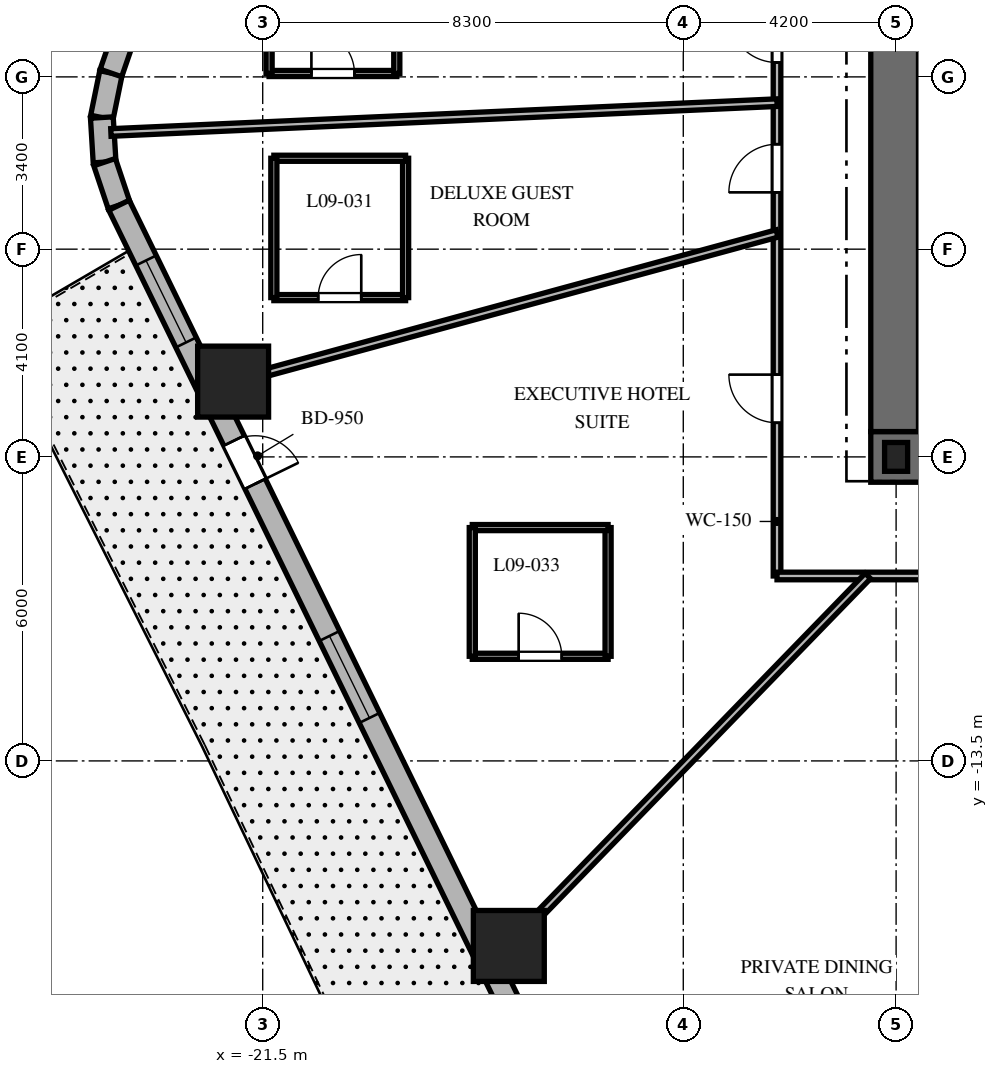
"""IFC4 building model, lengths in metres.
Left out: names, types, materials, properties, quantities, classifications, styles, units other than length and angle.
Written with IfcOpenShell. Run it as: python <this file> out.ifc"""

import sys

from ifc_helpers import new_model, si_unit, direction, frame, frame_2d, origin, origin_2d, place, context, subcontext, project, spatial, rectangle, i_section, extrude, element, fill, save


model = new_model("IFC4")
c1 = context("Model", 3, precision=1e-05, world=origin(), true_north=direction((0.0, 1.0)))
c2 = subcontext(c1, "Body", "Model", "MODEL_VIEW")
j1 = project(units=[si_unit("LENGTHUNIT", "METRE"), si_unit("PLANEANGLEUNIT", "RADIAN")], contexts=[c1])
p1 = place(None, origin())
s1 = spatial("IfcSite", under=j1, at=p1, CompositionType="ELEMENT")
p2 = place(p1, origin())
s2 = spatial("IfcBuilding", under=s1, at=p2, CompositionType="ELEMENT")
p3 = place(p2, frame((0.0, 0.0, 45.3)))
s3 = spatial("IfcBuildingStorey", under=s2, at=p3, CompositionType="ELEMENT", Elevation=45.3)
p4 = place(p3, frame((-9.5, -7.5, 0.0), z_axis=(0.0, 0.0, 1.0), x_axis=(1.0, 0.0, 0.0)))
e1 = element("IfcWall", 1, at=p4, inside=s3, PredefinedType="SHEAR", context=c2, shape_type="SweptSolid", body=[
    extrude(rectangle(XDim=19.0, YDim=1.0, at=frame_2d((9.5, 0.0))), origin(), (0.0, 0.0, 1.0), 3.7),
])
p5 = place(p4, frame((9.55, 0.0, 0.0)))
e2 = element("IfcOpeningElement", 2, at=p5, cuts=e1, PredefinedType="OPENING", context=c2, shape_type="SweptSolid", body=[
    extrude(rectangle(XDim=1.0, YDim=2.15, at=frame_2d((0.5, 1.075))), frame((0.0, 0.51, 0.0), z_axis=(0.0, -1.0, 0.0), x_axis=(1.0, 0.0, 0.0)), (0.0, 0.0, 1.0), 1.02),
])
p6 = place(p3, frame((-9.0, -7.0, 0.0), z_axis=(0.0, 0.0, 1.0), x_axis=(0.0, 1.0, 0.0)))
e3 = element("IfcWall", 3, at=p6, inside=s3, PredefinedType="SHEAR", context=c2, shape_type="SweptSolid", body=[
    extrude(rectangle(XDim=14.0, YDim=1.0, at=frame_2d((7.0, 0.0))), origin(), (0.0, 0.0, 1.0), 3.7),
])
p7 = place(p6, frame((10.125, 0.0, 0.0)))
e4 = element("IfcOpeningElement", 4, at=p7, cuts=e3, PredefinedType="OPENING", context=c2, shape_type="SweptSolid", body=[
    extrude(rectangle(XDim=1.05, YDim=2.15, at=frame_2d((0.525, 1.075))), frame((0.0, 0.51, 0.0), z_axis=(0.0, -1.0, 0.0), x_axis=(1.0, 0.0, 0.0)), (0.0, 0.0, 1.0), 1.02),
])
p8 = place(p3, frame((-8.458, -6.985, 0.0), z_axis=(0.0, 0.0, 1.0), x_axis=(0.0, 1.0, 0.0)))
e5 = element("IfcWall", 5, at=p8, inside=s3, PredefinedType="SHEAR", context=c2, shape_type="SweptSolid", body=[
    extrude(rectangle(XDim=9.143, YDim=0.2, at=frame_2d((4.572, 0.0))), origin(), (0.0, 0.0, 1.0), 3.7),
])
p9 = place(p3, frame((-9.0, -7.5, 0.0), z_axis=(0.0, 0.0, 1.0), x_axis=(1.0, 0.0, 0.0)))
e6 = element("IfcColumn", 6, at=p9, inside=s3, PredefinedType="COLUMN", context=c2, shape_type="SweptSolid", body=[
    extrude(i_section(OverallWidth=0.454, OverallDepth=0.569, WebThickness=0.078, FlangeThickness=0.125, at=origin_2d()), origin(), (0.0, 0.0, 1.0), 3.7),
])
for number, where, z_axis, x_axis in (
    (7, (-22.084, -6.014, 0.0), (0.0, 0.0, 1.0), (1.0, 0.0, 0.0)),
    (8, (-16.643, -17.152, 0.0), (0.0, 0.0, 1.0), (1.0, 0.0, 0.0)),
):
    element("IfcColumn", number, at=place(p3, frame(where, z_axis=z_axis, x_axis=x_axis)), inside=s3, PredefinedType="COLUMN", context=c2, shape_type="SweptSolid", body=[
        extrude(rectangle(XDim=1.4, YDim=1.4, at=origin_2d()), origin(), (0.0, 0.0, 1.0), 3.7),
    ])
p10 = place(p3, frame((-24.496, 0.077, 0.0), z_axis=(0.0, 0.0, 1.0), x_axis=(-0.199570594521, -0.979883451132, 0.0)))
e9 = element("IfcWall", 9, at=p10, inside=s3, PredefinedType="SOLIDWALL", context=c2, shape_type="SweptSolid", body=[
    extrude(rectangle(XDim=0.897, YDim=0.45, at=frame_2d((0.448, 0.0))), origin(), (0.0, 0.0, 1.0), 3.4),
])
p11 = place(p3, frame((-24.675, -0.802, 0.0), z_axis=(0.0, 0.0, 1.0), x_axis=(0.061188874166, -0.998126205286, 0.0)))
e10 = element("IfcWall", 10, at=p11, inside=s3, PredefinedType="SOLIDWALL", context=c2, shape_type="SweptSolid", body=[
    extrude(rectangle(XDim=0.882, YDim=0.45, at=frame_2d((0.441, 0.0))), origin(), (0.0, 0.0, 1.0), 3.4),
])
p12 = place(p3, frame((-24.621, -1.682, 0.0), z_axis=(0.0, 0.0, 1.0), x_axis=(0.317697451681, -0.948192137278, 0.0)))
e11 = element("IfcWall", 11, at=p12, inside=s3, PredefinedType="SOLIDWALL", context=c2, shape_type="SweptSolid", body=[
    extrude(rectangle(XDim=0.897, YDim=0.45, at=frame_2d((0.448, 0.0))), origin(), (0.0, 0.0, 1.0), 3.4),
])
p13 = place(p3, frame((-17.39, 20.678, 0.0), z_axis=(0.0, 0.0, 1.0), x_axis=(-0.326068018294, -0.945346310854, 0.0)))
e12 = element("IfcWall", 12, at=p13, inside=s3, PredefinedType="SOLIDWALL", context=c2, shape_type="SweptSolid", body=[
    extrude(rectangle(XDim=21.793, YDim=0.45, at=frame_2d((10.896, 0.0))), origin(), (0.0, 0.0, 1.0), 3.4),
])
p14 = place(p13, frame((5.493, 0.0, 0.0)))
e13 = element("IfcOpeningElement", 13, at=p14, cuts=e12, PredefinedType="OPENING", context=c2, shape_type="SweptSolid", body=[
    extrude(rectangle(XDim=1.0, YDim=2.15, at=frame_2d((0.5, 1.075))), frame((0.0, 0.235, 0.0), z_axis=(0.0, -1.0, 0.0), x_axis=(1.0, 0.0, 0.0)), (0.0, 0.0, 1.0), 0.47),
])
p15 = place(p13, frame((1.26, 0.0, 0.8)))
e14 = element("IfcOpeningElement", 14, at=p15, cuts=e12, PredefinedType="OPENING", context=c2, shape_type="SweptSolid", body=[
    extrude(rectangle(XDim=1.8, YDim=1.8, at=frame_2d((0.9, 0.9))), frame((0.0, 0.235, 0.0), z_axis=(0.0, -1.0, 0.0), x_axis=(1.0, 0.0, 0.0)), (0.0, 0.0, 1.0), 0.47),
])
p16 = place(p13, frame((7.283, 0.0, 0.8)))
e15 = element("IfcOpeningElement", 15, at=p16, cuts=e12, PredefinedType="OPENING", context=c2, shape_type="SweptSolid", body=[
    extrude(rectangle(XDim=1.8, YDim=1.8, at=frame_2d((0.9, 0.9))), frame((0.0, 0.235, 0.0), z_axis=(0.0, -1.0, 0.0), x_axis=(1.0, 0.0, 0.0)), (0.0, 0.0, 1.0), 0.47),
])
p17 = place(p13, frame((12.736, 0.0, 0.8)))
e16 = element("IfcOpeningElement", 16, at=p17, cuts=e12, PredefinedType="OPENING", context=c2, shape_type="SweptSolid", body=[
    extrude(rectangle(XDim=1.8, YDim=1.8, at=frame_2d((0.9, 0.9))), frame((0.0, 0.235, 0.0), z_axis=(0.0, -1.0, 0.0), x_axis=(1.0, 0.0, 0.0)), (0.0, 0.0, 1.0), 0.47),
])
p18 = place(p13, frame((18.68, 0.0, 0.8)))
e17 = element("IfcOpeningElement", 17, at=p18, cuts=e12, PredefinedType="OPENING", context=c2, shape_type="SweptSolid", body=[
    extrude(rectangle(XDim=1.8, YDim=1.8, at=frame_2d((0.9, 0.9))), frame((0.0, 0.235, 0.0), z_axis=(0.0, -1.0, 0.0), x_axis=(1.0, 0.0, 0.0)), (0.0, 0.0, 1.0), 0.47),
])
p19 = place(p3, frame((-24.336, -2.532, 0.0), z_axis=(0.0, 0.0, 1.0), x_axis=(0.438931326393, -0.898520612291, 0.0)))
e18 = element("IfcWall", 18, at=p19, inside=s3, PredefinedType="SOLIDWALL", context=c2, shape_type="SweptSolid", body=[
    extrude(rectangle(XDim=20.623, YDim=0.45, at=frame_2d((10.312, 0.0))), origin(), (0.0, 0.0, 1.0), 3.4),
])
p20 = place(p19, frame((5.171, 0.0, 0.0)))
e19 = element("IfcOpeningElement", 19, at=p20, cuts=e18, PredefinedType="OPENING", context=c2, shape_type="SweptSolid", body=[
    extrude(rectangle(XDim=0.95, YDim=2.15, at=frame_2d((0.475, 1.075))), frame((0.0, 0.235, 0.0), z_axis=(0.0, -1.0, 0.0), x_axis=(1.0, 0.0, 0.0)), (0.0, 0.0, 1.0), 0.47),
])
p21 = place(p19, frame((1.214, 0.0, 0.8)))
e20 = element("IfcOpeningElement", 20, at=p21, cuts=e18, PredefinedType="OPENING", context=c2, shape_type="SweptSolid", body=[
    extrude(rectangle(XDim=1.8, YDim=1.8, at=frame_2d((0.9, 0.9))), frame((0.0, 0.235, 0.0), z_axis=(0.0, -1.0, 0.0), x_axis=(1.0, 0.0, 0.0)), (0.0, 0.0, 1.0), 0.47),
])
p22 = place(p19, frame((9.462, 0.0, 0.8)))
e21 = element("IfcOpeningElement", 21, at=p22, cuts=e18, PredefinedType="OPENING", context=c2, shape_type="SweptSolid", body=[
    extrude(rectangle(XDim=1.8, YDim=1.8, at=frame_2d((0.9, 0.9))), frame((0.0, 0.235, 0.0), z_axis=(0.0, -1.0, 0.0), x_axis=(1.0, 0.0, 0.0)), (0.0, 0.0, 1.0), 0.47),
])
p23 = place(p19, frame((17.66, 0.0, 0.8)))
e22 = element("IfcOpeningElement", 22, at=p23, cuts=e18, PredefinedType="OPENING", context=c2, shape_type="SweptSolid", body=[
    extrude(rectangle(XDim=1.8, YDim=1.8, at=frame_2d((0.9, 0.9))), frame((0.0, 0.235, 0.0), z_axis=(0.0, -1.0, 0.0), x_axis=(1.0, 0.0, 0.0)), (0.0, 0.0, 1.0), 0.47),
])
p24 = place(p3, frame((-11.35, -9.85, 0.0), z_axis=(0.0, 0.0, 1.0), x_axis=(0.0, 1.0, 0.0)))
e23 = element("IfcWall", 23, at=p24, inside=s3, PredefinedType="PARTITIONING", context=c2, shape_type="SweptSolid", body=[
    extrude(rectangle(XDim=19.7, YDim=0.15, at=frame_2d((9.85, 0.0))), origin(), (0.0, 0.0, 1.0), 2.84),
])
p25 = place(p24, frame((17.181, 0.0, 0.0)))
e24 = element("IfcOpeningElement", 24, at=p25, cuts=e23, PredefinedType="OPENING", context=c2, shape_type="SweptSolid", body=[
    extrude(rectangle(XDim=0.95, YDim=2.03, at=frame_2d((0.475, 1.015))), frame((0.0, 0.085, 0.0), z_axis=(0.0, -1.0, 0.0), x_axis=(1.0, 0.0, 0.0)), (0.0, 0.0, 1.0), 0.17),
])
p26 = place(p24, frame((13.403, 0.0, 0.0)))
e25 = element("IfcOpeningElement", 25, at=p26, cuts=e23, PredefinedType="OPENING", context=c2, shape_type="SweptSolid", body=[
    extrude(rectangle(XDim=0.95, YDim=2.03, at=frame_2d((0.475, 1.015))), frame((0.0, 0.085, 0.0), z_axis=(0.0, -1.0, 0.0), x_axis=(1.0, 0.0, 0.0)), (0.0, 0.0, 1.0), 0.17),
])
p27 = place(p24, frame((10.134, 0.0, 0.0)))
e26 = element("IfcOpeningElement", 26, at=p27, cuts=e23, PredefinedType="OPENING", context=c2, shape_type="SweptSolid", body=[
    extrude(rectangle(XDim=0.95, YDim=2.03, at=frame_2d((0.475, 1.015))), frame((0.0, 0.085, 0.0), z_axis=(0.0, -1.0, 0.0), x_axis=(1.0, 0.0, 0.0)), (0.0, 0.0, 1.0), 0.17),
])
p28 = place(p24, frame((7.571, 0.0, 0.0)))
e27 = element("IfcOpeningElement", 27, at=p28, cuts=e23, PredefinedType="OPENING", context=c2, shape_type="SweptSolid", body=[
    extrude(rectangle(XDim=0.95, YDim=2.03, at=frame_2d((0.475, 1.015))), frame((0.0, 0.085, 0.0), z_axis=(0.0, -1.0, 0.0), x_axis=(1.0, 0.0, 0.0)), (0.0, 0.0, 1.0), 0.17),
])
p29 = place(p24, frame((3.024, 0.0, 0.0)))
e28 = element("IfcOpeningElement", 28, at=p29, cuts=e23, PredefinedType="OPENING", context=c2, shape_type="SweptSolid", body=[
    extrude(rectangle(XDim=0.95, YDim=2.03, at=frame_2d((0.475, 1.015))), frame((0.0, 0.085, 0.0), z_axis=(0.0, -1.0, 0.0), x_axis=(1.0, 0.0, 0.0)), (0.0, 0.0, 1.0), 0.17),
])
p30 = place(p3, frame((11.35, -9.85, 0.0), z_axis=(0.0, 0.0, 1.0), x_axis=(-1.0, 0.0, 0.0)))
e29 = element("IfcWall", 29, at=p30, inside=s3, PredefinedType="PARTITIONING", context=c2, shape_type="SweptSolid", body=[
    extrude(rectangle(XDim=22.7, YDim=0.15, at=frame_2d((11.35, 0.0))), origin(), (0.0, 0.0, 1.0), 2.84),
])
p31 = place(p30, frame((17.225, 0.0, 0.0)))
e30 = element("IfcOpeningElement", 30, at=p31, cuts=e29, PredefinedType="OPENING", context=c2, shape_type="SweptSolid", body=[
    extrude(rectangle(XDim=0.95, YDim=2.03, at=frame_2d((0.475, 1.015))), frame((0.0, 0.085, 0.0), z_axis=(0.0, -1.0, 0.0), x_axis=(1.0, 0.0, 0.0)), (0.0, 0.0, 1.0), 0.17),
])
p32 = place(p30, frame((12.214, 0.0, 0.0)))
e31 = element("IfcOpeningElement", 31, at=p32, cuts=e29, PredefinedType="OPENING", context=c2, shape_type="SweptSolid", body=[
    extrude(rectangle(XDim=0.95, YDim=2.03, at=frame_2d((0.475, 1.015))), frame((0.0, 0.085, 0.0), z_axis=(0.0, -1.0, 0.0), x_axis=(1.0, 0.0, 0.0)), (0.0, 0.0, 1.0), 0.17),
])
p33 = place(p30, frame((8.725, 0.0, 0.0)))
e32 = element("IfcOpeningElement", 32, at=p33, cuts=e29, PredefinedType="OPENING", context=c2, shape_type="SweptSolid", body=[
    extrude(rectangle(XDim=0.95, YDim=2.03, at=frame_2d((0.475, 1.015))), frame((0.0, 0.085, 0.0), z_axis=(0.0, -1.0, 0.0), x_axis=(1.0, 0.0, 0.0)), (0.0, 0.0, 1.0), 0.17),
])
p34 = place(p30, frame((3.369, 0.0, 0.0)))
e33 = element("IfcOpeningElement", 33, at=p34, cuts=e29, PredefinedType="OPENING", context=c2, shape_type="SweptSolid", body=[
    extrude(rectangle(XDim=0.95, YDim=2.03, at=frame_2d((0.475, 1.015))), frame((0.0, 0.085, 0.0), z_axis=(0.0, -1.0, 0.0), x_axis=(1.0, 0.0, 0.0)), (0.0, 0.0, 1.0), 0.17),
])
p35 = place(p3, frame((-11.35, -0.508, 0.0), z_axis=(0.0, 0.0, 1.0), x_axis=(-0.998998237556, -0.044749540337, 0.0)))
e34 = element("IfcWall", 34, at=p35, inside=s3, PredefinedType="PARTITIONING", context=c2, shape_type="SweptSolid", body=[
    extrude(rectangle(XDim=13.159, YDim=0.15, at=frame_2d((6.58, 0.0))), origin(), (0.0, 0.0, 1.0), 2.54),
])
p36 = place(p3, frame((-11.35, -3.091, 0.0), z_axis=(0.0, 0.0, 1.0), x_axis=(-0.964859685283, -0.262765651704, 0.0)))
e35 = element("IfcWall", 35, at=p36, inside=s3, PredefinedType="PARTITIONING", context=c2, shape_type="SweptSolid", body=[
    extrude(rectangle(XDim=11.629, YDim=0.15, at=frame_2d((5.814, 0.0))), origin(), (0.0, 0.0, 1.0), 2.54),
])
p37 = place(p3, frame((-9.558, -9.85, 0.0), z_axis=(0.0, 0.0, 1.0), x_axis=(-0.69638346089, -0.717669893056, 0.0)))
e36 = element("IfcWall", 36, at=p37, inside=s3, PredefinedType="PARTITIONING", context=c2, shape_type="SweptSolid", body=[
    extrude(rectangle(XDim=10.701, YDim=0.15, at=frame_2d((5.351, 0.0))), origin(), (0.0, 0.0, 1.0), 2.54),
])
p38 = place(p3, frame((-21.374, 0.067, 0.0), z_axis=(0.0, 0.0, 1.0), x_axis=(1.0, 0.0, 0.0)))
e37 = element("IfcWall", 37, at=p38, inside=s3, PredefinedType="PARTITIONING", context=c2, shape_type="SweptSolid", body=[
    extrude(rectangle(XDim=2.52, YDim=0.12, at=frame_2d((1.26, 0.0))), origin(), (0.0, 0.0, 1.0), 3.4),
])
p39 = place(p38, frame((0.835, 0.0, 0.0)))
e38 = element("IfcOpeningElement", 38, at=p39, cuts=e37, PredefinedType="OPENING", context=c2, shape_type="SweptSolid", body=[
    extrude(rectangle(XDim=0.85, YDim=2.03, at=frame_2d((0.425, 1.015))), frame((0.0, 0.07, 0.0), z_axis=(0.0, -1.0, 0.0), x_axis=(1.0, 0.0, 0.0)), (0.0, 0.0, 1.0), 0.14),
])
for number, where, z_axis, x_axis in (
    (39, (-18.854, 0.067, 0.0), (0.0, 0.0, 1.0), (0.0, 1.0, 0.0)),
    (40, (-21.374, 2.747, 0.0), (0.0, 0.0, 1.0), (0.0, -1.0, 0.0)),
):
    element("IfcWall", number, at=place(p3, frame(where, z_axis=z_axis, x_axis=x_axis)), inside=s3, PredefinedType="PARTITIONING", context=c2, shape_type="SweptSolid", body=[
        extrude(rectangle(XDim=2.68, YDim=0.12, at=frame_2d((1.34, 0.0))), origin(), (0.0, 0.0, 1.0), 3.4),
    ])
p40 = place(p3, frame((-21.28, -4.356, 0.0), z_axis=(0.0, 0.0, 1.0), x_axis=(1.0, 0.0, 0.0)))
e41 = element("IfcWall", 41, at=p40, inside=s3, PredefinedType="PARTITIONING", context=c2, shape_type="SweptSolid", body=[
    extrude(rectangle(XDim=2.6, YDim=0.12, at=frame_2d((1.3, 0.0))), origin(), (0.0, 0.0, 1.0), 3.4),
])
p41 = place(p40, frame((0.875, 0.0, 0.0)))
e42 = element("IfcOpeningElement", 42, at=p41, cuts=e41, PredefinedType="OPENING", context=c2, shape_type="SweptSolid", body=[
    extrude(rectangle(XDim=0.85, YDim=2.03, at=frame_2d((0.425, 1.015))), frame((0.0, 0.07, 0.0), z_axis=(0.0, -1.0, 0.0), x_axis=(1.0, 0.0, 0.0)), (0.0, 0.0, 1.0), 0.14),
])
p42 = place(p3, frame((-18.68, -4.356, 0.0), z_axis=(0.0, 0.0, 1.0), x_axis=(0.0, 1.0, 0.0)))
e43 = element("IfcWall", 43, at=p42, inside=s3, PredefinedType="PARTITIONING", context=c2, shape_type="SweptSolid", body=[
    extrude(rectangle(XDim=2.75, YDim=0.12, at=frame_2d((1.375, 0.0))), origin(), (0.0, 0.0, 1.0), 3.4),
])
p43 = place(p3, frame((-18.68, -1.606, 0.0), z_axis=(0.0, 0.0, 1.0), x_axis=(-1.0, 0.0, 0.0)))
e44 = element("IfcWall", 44, at=p43, inside=s3, PredefinedType="PARTITIONING", context=c2, shape_type="SweptSolid", body=[
    extrude(rectangle(XDim=2.6, YDim=0.12, at=frame_2d((1.3, 0.0))), origin(), (0.0, 0.0, 1.0), 3.4),
])
p44 = place(p3, frame((-21.28, -1.606, 0.0), z_axis=(0.0, 0.0, 1.0), x_axis=(0.0, -1.0, 0.0)))
e45 = element("IfcWall", 45, at=p44, inside=s3, PredefinedType="PARTITIONING", context=c2, shape_type="SweptSolid", body=[
    extrude(rectangle(XDim=2.75, YDim=0.12, at=frame_2d((1.375, 0.0))), origin(), (0.0, 0.0, 1.0), 3.4),
])
p45 = place(p3, frame((-17.364, -11.435, 0.0), z_axis=(0.0, 0.0, 1.0), x_axis=(1.0, 0.0, 0.0)))
e46 = element("IfcWall", 46, at=p45, inside=s3, PredefinedType="PARTITIONING", context=c2, shape_type="SweptSolid", body=[
    extrude(rectangle(XDim=2.68, YDim=0.12, at=frame_2d((1.34, 0.0))), origin(), (0.0, 0.0, 1.0), 2.927),
])
p46 = place(p45, frame((0.915, 0.0, 0.0)))
e47 = element("IfcOpeningElement", 47, at=p46, cuts=e46, PredefinedType="OPENING", context=c2, shape_type="SweptSolid", body=[
    extrude(rectangle(XDim=0.85, YDim=2.03, at=frame_2d((0.425, 1.015))), frame((0.0, 0.07, 0.0), z_axis=(0.0, -1.0, 0.0), x_axis=(1.0, 0.0, 0.0)), (0.0, 0.0, 1.0), 0.14),
])
p47 = place(p3, frame((-14.684, -11.435, 0.0), z_axis=(0.0, 0.0, 1.0), x_axis=(0.0, 1.0, 0.0)))
e48 = element("IfcWall", 48, at=p47, inside=s3, PredefinedType="PARTITIONING", context=c2, shape_type="SweptSolid", body=[
    extrude(rectangle(XDim=2.54, YDim=0.12, at=frame_2d((1.27, 0.0))), origin(), (0.0, 0.0, 1.0), 3.4),
])
p48 = place(p3, frame((-14.684, -8.895, 0.0), z_axis=(0.0, 0.0, 1.0), x_axis=(-1.0, 0.0, 0.0)))
e49 = element("IfcWall", 49, at=p48, inside=s3, PredefinedType="PARTITIONING", context=c2, shape_type="SweptSolid", body=[
    extrude(rectangle(XDim=2.68, YDim=0.12, at=frame_2d((1.34, 0.0))), origin(), (0.0, 0.0, 1.0), 2.927),
])
p49 = place(p3, frame((-17.364, -8.895, 0.0), z_axis=(0.0, 0.0, 1.0), x_axis=(0.0, -1.0, 0.0)))
e50 = element("IfcWall", 50, at=p49, inside=s3, PredefinedType="PARTITIONING", context=c2, shape_type="SweptSolid", body=[
    extrude(rectangle(XDim=2.54, YDim=0.12, at=frame_2d((1.27, 0.0))), origin(), (0.0, 0.0, 1.0), 3.4),
])
p50 = place(p20, origin())
e51 = element("IfcDoor", 51, at=p50, inside=s3, OperationType="SINGLE_SWING_RIGHT", PredefinedType="DOOR", context=c2, shape_type="SweptSolid", body=[
    extrude(rectangle(XDim=0.95, YDim=2.15, at=frame_2d((0.475, 1.075))), frame((0.0, 0.025, 0.0), z_axis=(0.0, -1.0, 0.0), x_axis=(1.0, 0.0, 0.0)), (0.0, 0.0, 1.0), 0.05),
])
fill(e19, e51)
p51 = place(p21, origin())
e52 = element("IfcWindow", 52, at=p51, inside=s3, PartitioningType="SINGLE_PANEL", PredefinedType="WINDOW", context=c2, shape_type="SweptSolid", body=[
    extrude(rectangle(XDim=1.8, YDim=1.8, at=frame_2d((0.9, 0.9))), frame((0.0, 0.03, 0.0), z_axis=(0.0, -1.0, 0.0), x_axis=(1.0, 0.0, 0.0)), (0.0, 0.0, 1.0), 0.06),
])
fill(e20, e52)
p52 = place(p22, origin())
e53 = element("IfcWindow", 53, at=p52, inside=s3, PartitioningType="SINGLE_PANEL", PredefinedType="WINDOW", context=c2, shape_type="SweptSolid", body=[
    extrude(rectangle(XDim=1.8, YDim=1.8, at=frame_2d((0.9, 0.9))), frame((0.0, 0.03, 0.0), z_axis=(0.0, -1.0, 0.0), x_axis=(1.0, 0.0, 0.0)), (0.0, 0.0, 1.0), 0.06),
])
fill(e21, e53)
p53 = place(p27, origin())
e54 = element("IfcDoor", 54, at=p53, inside=s3, OperationType="SINGLE_SWING_RIGHT", PredefinedType="DOOR", context=c2, shape_type="SweptSolid", body=[
    extrude(rectangle(XDim=0.95, YDim=2.03, at=frame_2d((0.475, 1.015))), frame((0.0, 0.025, 0.0), z_axis=(0.0, -1.0, 0.0), x_axis=(1.0, 0.0, 0.0)), (0.0, 0.0, 1.0), 0.05),
])
fill(e26, e54)
p54 = place(p39, origin())
e55 = element("IfcDoor", 55, at=p54, inside=s3, OperationType="SINGLE_SWING_LEFT", PredefinedType="DOOR", context=c2, shape_type="SweptSolid", body=[
    extrude(rectangle(XDim=0.85, YDim=2.03, at=frame_2d((0.425, 1.015))), frame((0.0, 0.025, 0.0), z_axis=(0.0, -1.0, 0.0), x_axis=(1.0, 0.0, 0.0)), (0.0, 0.0, 1.0), 0.05),
])
fill(e38, e55)
p55 = place(p28, origin())
e56 = element("IfcDoor", 56, at=p55, inside=s3, OperationType="SINGLE_SWING_LEFT", PredefinedType="DOOR", context=c2, shape_type="SweptSolid", body=[
    extrude(rectangle(XDim=0.95, YDim=2.03, at=frame_2d((0.475, 1.015))), frame((0.0, 0.025, 0.0), z_axis=(0.0, -1.0, 0.0), x_axis=(1.0, 0.0, 0.0)), (0.0, 0.0, 1.0), 0.05),
])
fill(e27, e56)
p56 = place(p41, origin())
e57 = element("IfcDoor", 57, at=p56, inside=s3, OperationType="SINGLE_SWING_RIGHT", PredefinedType="DOOR", context=c2, shape_type="SweptSolid", body=[
    extrude(rectangle(XDim=0.85, YDim=2.03, at=frame_2d((0.425, 1.015))), frame((0.0, 0.025, 0.0), z_axis=(0.0, -1.0, 0.0), x_axis=(1.0, 0.0, 0.0)), (0.0, 0.0, 1.0), 0.05),
])
fill(e42, e57)
p57 = place(p29, origin())
e58 = element("IfcDoor", 58, at=p57, inside=s3, OperationType="SINGLE_SWING_RIGHT", PredefinedType="DOOR", context=c2, shape_type="SweptSolid", body=[
    extrude(rectangle(XDim=0.95, YDim=2.03, at=frame_2d((0.475, 1.015))), frame((0.0, 0.025, 0.0), z_axis=(0.0, -1.0, 0.0), x_axis=(1.0, 0.0, 0.0)), (0.0, 0.0, 1.0), 0.05),
])
fill(e28, e58)
p58 = place(p46, origin())
e59 = element("IfcDoor", 59, at=p58, inside=s3, OperationType="SINGLE_SWING_LEFT", PredefinedType="DOOR", context=c2, shape_type="SweptSolid", body=[
    extrude(rectangle(XDim=0.85, YDim=2.03, at=frame_2d((0.425, 1.015))), frame((0.0, 0.025, 0.0), z_axis=(0.0, -1.0, 0.0), x_axis=(1.0, 0.0, 0.0)), (0.0, 0.0, 1.0), 0.05),
])
fill(e47, e59)
save(model, sys.argv[1])
